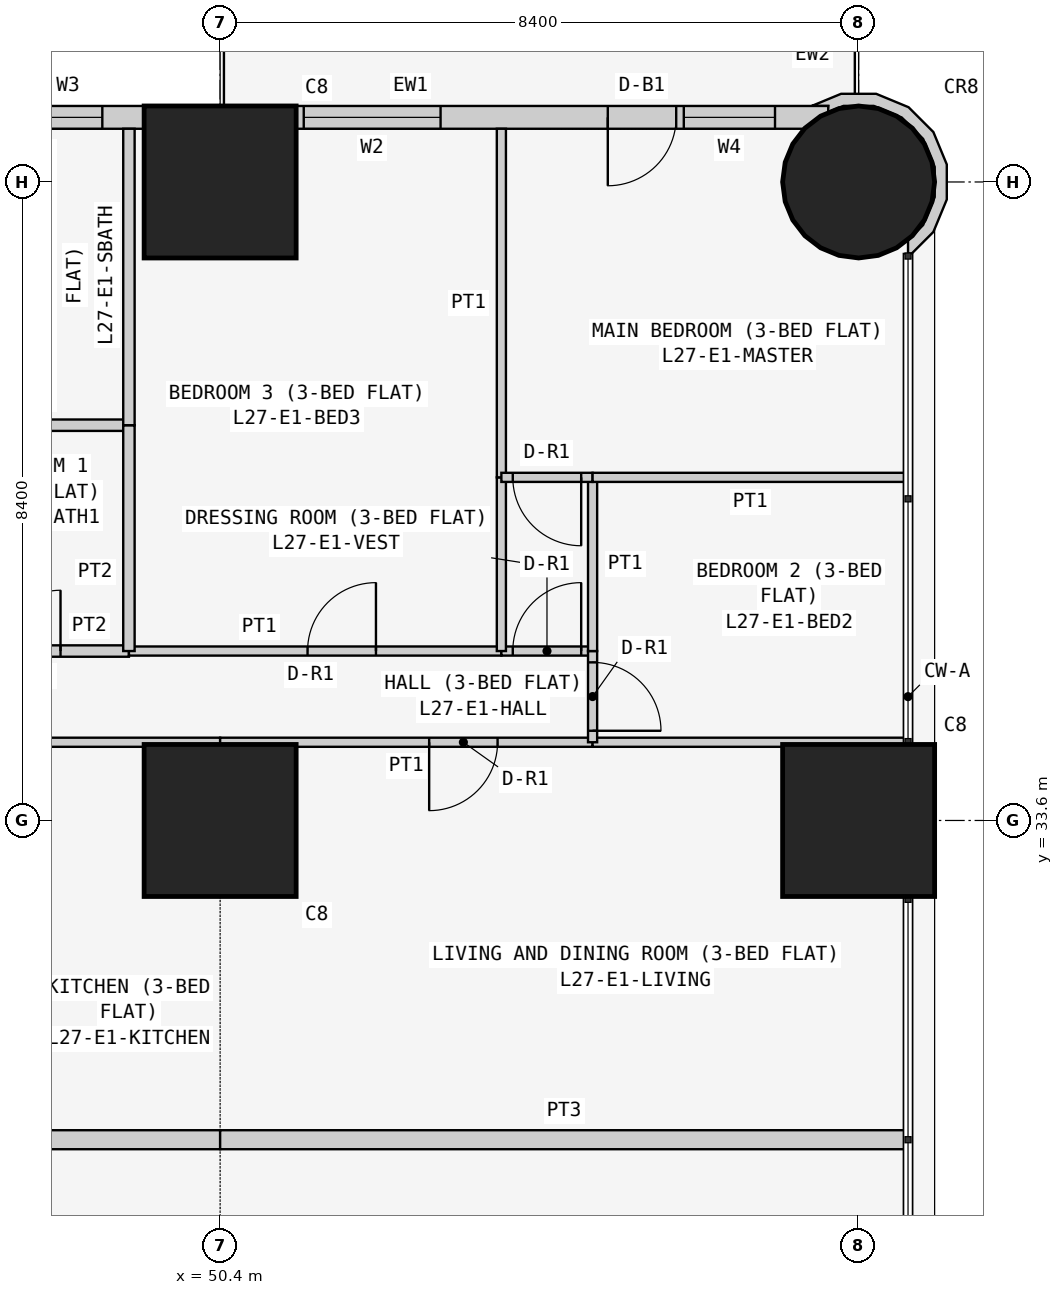
"""IFC4 building model, lengths in metres.
Left out: names, types, materials, properties, quantities, classifications, styles, units other than length and angle.
Written with IfcOpenShell. Run it as: python <this file> out.ifc"""

import sys

from ifc_helpers import new_model, si_unit, direction, frame, frame_2d, origin, origin_2d, place, context, subcontext, project, spatial, polyline, rectangle, circle, outline, extrude, element, fill, save


model = new_model("IFC4")
c1 = context("Model", 3, precision=1e-05, world=origin(), true_north=direction((0.0, 1.0)))
c2 = subcontext(c1, "Body", "Model", "MODEL_VIEW")
j1 = project(units=[si_unit("LENGTHUNIT", "METRE"), si_unit("PLANEANGLEUNIT", "RADIAN")], contexts=[c1])
p1 = place(None, origin())
s1 = spatial("IfcSite", under=j1, at=p1, CompositionType="ELEMENT")
p2 = place(p1, origin())
s2 = spatial("IfcBuilding", under=s1, at=p2, CompositionType="ELEMENT")
p3 = place(p2, frame((0.0, 0.0, 108.9)))
s3 = spatial("IfcBuildingStorey", under=s2, at=p3, CompositionType="ELEMENT", Elevation=108.9)
for number, where, z_axis, x_axis in (
    (1, (50.4, 33.6, 0.0), (0.0, 0.0, 1.0), (1.0, 0.0, 0.0)),
    (2, (50.4, 42.0, 0.0), (0.0, 0.0, 1.0), (1.0, 0.0, 0.0)),
    (3, (58.8, 33.6, 0.0), (0.0, 0.0, 1.0), (1.0, 0.0, 0.0)),
):
    element("IfcColumn", number, at=place(p3, frame(where, z_axis=z_axis, x_axis=x_axis)), inside=s3, PredefinedType="COLUMN", context=c2, shape_type="SweptSolid", body=[
        extrude(rectangle(XDim=2.0, YDim=2.0, at=origin_2d()), origin(), (0.0, 0.0, 1.0), 3.6),
    ])
p4 = place(p3, frame((58.8, 42.0, 0.0), z_axis=(0.0, 0.0, 1.0), x_axis=(1.0, 0.0, 0.0)))
e4 = element("IfcColumn", 4, at=p4, inside=s3, PredefinedType="COLUMN", context=c2, shape_type="SweptSolid", body=[
    extrude(circle(Radius=1.0, at=origin_2d()), origin(), (0.0, 0.0, 1.0), 3.6),
])
p5 = place(p3, frame((58.4, 42.85, 0.0), z_axis=(0.0, 0.0, 1.0), x_axis=(-1.0, 0.0, 0.0)))
e5 = element("IfcWall", 5, at=p5, inside=s3, PredefinedType="SOLIDWALL", context=c2, shape_type="SweptSolid", body=[
    extrude(rectangle(XDim=15.7, YDim=0.3, at=frame_2d((7.85, 0.0))), origin(), (0.0, 0.0, 1.0), 3.45),
])
p6 = place(p5, frame((12.4, 0.0, 0.9)))
e6 = element("IfcOpeningElement", 6, at=p6, cuts=e5, PredefinedType="OPENING", context=c2, shape_type="SweptSolid", body=[
    extrude(rectangle(XDim=1.8, YDim=1.5, at=frame_2d((0.9, 0.75))), frame((0.0, 0.16, 0.0), z_axis=(0.0, -1.0, 0.0), x_axis=(1.0, 0.0, 0.0)), (0.0, 0.0, 1.0), 0.32),
])
p7 = place(p5, frame((9.55, 0.0, 1.5)))
e7 = element("IfcOpeningElement", 7, at=p7, cuts=e5, PredefinedType="OPENING", context=c2, shape_type="SweptSolid", body=[
    extrude(rectangle(XDim=0.9, YDim=0.7, at=frame_2d((0.45, 0.35))), frame((0.0, 0.16, 0.0), z_axis=(0.0, -1.0, 0.0), x_axis=(1.0, 0.0, 0.0)), (0.0, 0.0, 1.0), 0.32),
])
p8 = place(p5, frame((5.1, 0.0, 0.9)))
e8 = element("IfcOpeningElement", 8, at=p8, cuts=e5, PredefinedType="OPENING", context=c2, shape_type="SweptSolid", body=[
    extrude(rectangle(XDim=1.8, YDim=1.5, at=frame_2d((0.9, 0.75))), frame((0.0, 0.16, 0.0), z_axis=(0.0, -1.0, 0.0), x_axis=(1.0, 0.0, 0.0)), (0.0, 0.0, 1.0), 0.32),
])
p9 = place(p5, frame((2.0, 0.0, 0.0)))
e9 = element("IfcOpeningElement", 9, at=p9, cuts=e5, PredefinedType="OPENING", context=c2, shape_type="SweptSolid", body=[
    extrude(rectangle(XDim=0.9, YDim=2.4, at=frame_2d((0.45, 1.2))), frame((0.0, 0.16, 0.0), z_axis=(0.0, -1.0, 0.0), x_axis=(1.0, 0.0, 0.0)), (0.0, 0.0, 1.0), 0.32),
])
p10 = place(p5, frame((0.7, 0.0, 0.9)))
e10 = element("IfcOpeningElement", 10, at=p10, cuts=e5, PredefinedType="OPENING", context=c2, shape_type="SweptSolid", body=[
    extrude(rectangle(XDim=1.2, YDim=1.5, at=frame_2d((0.6, 0.75))), frame((0.0, 0.16, 0.0), z_axis=(0.0, -1.0, 0.0), x_axis=(1.0, 0.0, 0.0)), (0.0, 0.0, 1.0), 0.32),
])
p11 = place(p3, frame((59.443, 41.132, 0.0), z_axis=(0.0, 0.0, 1.0), x_axis=(0.831199417842, 0.555974394895, 0.0)))
e11 = element("IfcWall", 11, at=p11, inside=s3, PredefinedType="SOLIDWALL", context=c2, shape_type="SweptSolid", body=[
    extrude(outline(polyline([(0.784, 0.242), (1.04, 0.626), (1.13, 1.078), (1.04, 1.531), (0.784, 1.915), (0.401, 2.171), (-0.009, 2.253), (0.171, 2.132), (0.113, 2.066), (0.339, 2.021), (0.67, 1.8), (0.891, 1.469), (0.968, 1.078), (0.89, 0.688), (0.669, 0.357), (0.338, 0.136), (0.062, 0.081), (-0.036, -0.066), (0.005, -0.093), (0.4, -0.014), (0.784, 0.242)])), origin(), (0.0, 0.0, 1.0), 3.45),
])
p12 = place(p3, frame((50.4, 34.629, 0.0), z_axis=(0.0, 0.0, 1.0), x_axis=(-1.0, 0.0, 0.0)))
e12 = element("IfcWall", 12, at=p12, inside=s3, PredefinedType="PARTITIONING", context=c2, shape_type="SweptSolid", body=[
    extrude(rectangle(XDim=2.4, YDim=0.12, at=frame_2d((1.2, 0.0))), origin(), (0.0, 0.0, 1.0), 3.45),
])
p13 = place(p3, frame((48.0, 29.4, 0.0), z_axis=(0.0, 0.0, 1.0), x_axis=(1.0, 0.0, 0.0)))
e13 = element("IfcWall", 13, at=p13, inside=s3, PredefinedType="PARTITIONING", context=c2, shape_type="SweptSolid", body=[
    extrude(rectangle(XDim=2.4, YDim=0.25, at=frame_2d((1.2, 0.0))), origin(), (0.0, 0.0, 1.0), 3.45),
])
p14 = place(p3, frame((55.3, 34.629, 0.0), z_axis=(0.0, 0.0, 1.0), x_axis=(-1.0, 0.0, 0.0)))
e14 = element("IfcWall", 14, at=p14, inside=s3, PredefinedType="PARTITIONING", context=c2, shape_type="SweptSolid", body=[
    extrude(rectangle(XDim=4.9, YDim=0.12, at=frame_2d((2.45, 0.0))), origin(), (0.0, 0.0, 1.0), 3.45),
])
p15 = place(p14, frame((1.25, 0.0, 0.0)))
e15 = element("IfcOpeningElement", 15, at=p15, cuts=e14, PredefinedType="OPENING", context=c2, shape_type="SweptSolid", body=[
    extrude(rectangle(XDim=0.9, YDim=2.1, at=frame_2d((0.45, 1.05))), frame((0.0, 0.07, 0.0), z_axis=(0.0, -1.0, 0.0), x_axis=(1.0, 0.0, 0.0)), (0.0, 0.0, 1.0), 0.14),
])
p16 = place(p3, frame((59.45, 34.629, 0.0), z_axis=(0.0, 0.0, 1.0), x_axis=(-1.0, 0.0, 0.0)))
e16 = element("IfcWall", 16, at=p16, inside=s3, PredefinedType="PARTITIONING", context=c2, shape_type="SweptSolid", body=[
    extrude(rectangle(XDim=4.15, YDim=0.12, at=frame_2d((2.075, 0.0))), origin(), (0.0, 0.0, 1.0), 3.45),
])
p17 = place(p3, frame((50.4, 29.4, 0.0), z_axis=(0.0, 0.0, 1.0), x_axis=(1.0, 0.0, 0.0)))
e17 = element("IfcWall", 17, at=p17, inside=s3, PredefinedType="PARTITIONING", context=c2, shape_type="SweptSolid", body=[
    extrude(rectangle(XDim=9.05, YDim=0.25, at=frame_2d((4.525, 0.0))), origin(), (0.0, 0.0, 1.0), 3.45),
])
p18 = place(p3, frame((49.2, 35.829, 0.0), z_axis=(0.0, 0.0, 1.0), x_axis=(-1.0, 0.0, 0.0)))
e18 = element("IfcWall", 18, at=p18, inside=s3, PredefinedType="PARTITIONING", context=c2, shape_type="SweptSolid", body=[
    extrude(rectangle(XDim=2.6, YDim=0.15, at=frame_2d((1.3, 0.0))), origin(), (0.0, 0.0, 1.0), 3.45),
])
p19 = place(p18, frame((0.9, 0.0, 0.0)))
e19 = element("IfcOpeningElement", 19, at=p19, cuts=e18, PredefinedType="OPENING", context=c2, shape_type="SweptSolid", body=[
    extrude(rectangle(XDim=0.8, YDim=2.1, at=frame_2d((0.4, 1.05))), frame((0.0, 0.085, 0.0), z_axis=(0.0, -1.0, 0.0), x_axis=(1.0, 0.0, 0.0)), (0.0, 0.0, 1.0), 0.17),
])
p20 = place(p3, frame((54.1, 35.829, 0.0), z_axis=(0.0, 0.0, 1.0), x_axis=(-1.0, 0.0, 0.0)))
e20 = element("IfcWall", 20, at=p20, inside=s3, PredefinedType="PARTITIONING", context=c2, shape_type="SweptSolid", body=[
    extrude(rectangle(XDim=4.9, YDim=0.12, at=frame_2d((2.45, 0.0))), origin(), (0.0, 0.0, 1.0), 3.45),
])
p21 = place(p20, frame((1.65, 0.0, 0.0)))
e21 = element("IfcOpeningElement", 21, at=p21, cuts=e20, PredefinedType="OPENING", context=c2, shape_type="SweptSolid", body=[
    extrude(rectangle(XDim=0.9, YDim=2.1, at=frame_2d((0.45, 1.05))), frame((0.0, 0.07, 0.0), z_axis=(0.0, -1.0, 0.0), x_axis=(1.0, 0.0, 0.0)), (0.0, 0.0, 1.0), 0.14),
])
p22 = place(p3, frame((55.3, 35.829, 0.0), z_axis=(0.0, 0.0, 1.0), x_axis=(-1.0, 0.0, 0.0)))
e22 = element("IfcWall", 22, at=p22, inside=s3, PredefinedType="PARTITIONING", context=c2, shape_type="SweptSolid", body=[
    extrude(rectangle(XDim=1.2, YDim=0.12, at=frame_2d((0.6, 0.0))), origin(), (0.0, 0.0, 1.0), 3.45),
])
p23 = place(p22, frame((0.15, 0.0, 0.0)))
e23 = element("IfcOpeningElement", 23, at=p23, cuts=e22, PredefinedType="OPENING", context=c2, shape_type="SweptSolid", body=[
    extrude(rectangle(XDim=0.9, YDim=2.1, at=frame_2d((0.45, 1.05))), frame((0.0, 0.07, 0.0), z_axis=(0.0, -1.0, 0.0), x_axis=(1.0, 0.0, 0.0)), (0.0, 0.0, 1.0), 0.14),
])
p24 = place(p3, frame((55.3, 34.629, 0.0), z_axis=(0.0, 0.0, 1.0), x_axis=(0.0, 1.0, 0.0)))
e24 = element("IfcWall", 24, at=p24, inside=s3, PredefinedType="PARTITIONING", context=c2, shape_type="SweptSolid", body=[
    extrude(rectangle(XDim=1.2, YDim=0.12, at=frame_2d((0.6, 0.0))), origin(), (0.0, 0.0, 1.0), 3.45),
])
p25 = place(p24, frame((0.151, 0.0, 0.0)))
e25 = element("IfcOpeningElement", 25, at=p25, cuts=e24, PredefinedType="OPENING", context=c2, shape_type="SweptSolid", body=[
    extrude(rectangle(XDim=0.9, YDim=2.1, at=frame_2d((0.45, 1.05))), frame((0.0, 0.07, 0.0), z_axis=(0.0, -1.0, 0.0), x_axis=(1.0, 0.0, 0.0)), (0.0, 0.0, 1.0), 0.14),
])
p26 = place(p3, frame((49.2, 38.8, 0.0), z_axis=(0.0, 0.0, 1.0), x_axis=(-1.0, 0.0, 0.0)))
e26 = element("IfcWall", 26, at=p26, inside=s3, PredefinedType="PARTITIONING", context=c2, shape_type="SweptSolid", body=[
    extrude(rectangle(XDim=2.6, YDim=0.15, at=frame_2d((1.3, 0.0))), origin(), (0.0, 0.0, 1.0), 3.45),
])
p27 = place(p3, frame((49.2, 35.829, 0.0), z_axis=(0.0, 0.0, 1.0), x_axis=(0.0, 1.0, 0.0)))
e27 = element("IfcWall", 27, at=p27, inside=s3, PredefinedType="PARTITIONING", context=c2, shape_type="SweptSolid", body=[
    extrude(rectangle(XDim=2.971, YDim=0.15, at=frame_2d((1.485, 0.0))), origin(), (0.0, 0.0, 1.0), 3.45),
])
p28 = place(p3, frame((49.2, 38.8, 0.0), z_axis=(0.0, 0.0, 1.0), x_axis=(0.0, 1.0, 0.0)))
e28 = element("IfcWall", 28, at=p28, inside=s3, PredefinedType="PARTITIONING", context=c2, shape_type="SweptSolid", body=[
    extrude(rectangle(XDim=3.9, YDim=0.15, at=frame_2d((1.95, 0.0))), origin(), (0.0, 0.0, 1.0), 3.45),
])
p29 = place(p3, frame((54.1, 35.829, 0.0), z_axis=(0.0, 0.0, 1.0), x_axis=(0.0, 1.0, 0.0)))
e29 = element("IfcWall", 29, at=p29, inside=s3, PredefinedType="PARTITIONING", context=c2, shape_type="SweptSolid", body=[
    extrude(rectangle(XDim=2.285, YDim=0.12, at=frame_2d((1.143, 0.0))), origin(), (0.0, 0.0, 1.0), 3.45),
])
p30 = place(p3, frame((54.1, 38.114, 0.0), z_axis=(0.0, 0.0, 1.0), x_axis=(0.0, 1.0, 0.0)))
e30 = element("IfcWall", 30, at=p30, inside=s3, PredefinedType="PARTITIONING", context=c2, shape_type="SweptSolid", body=[
    extrude(rectangle(XDim=4.586, YDim=0.12, at=frame_2d((2.293, 0.0))), origin(), (0.0, 0.0, 1.0), 3.45),
])
p31 = place(p3, frame((55.3, 35.829, 0.0), z_axis=(0.0, 0.0, 1.0), x_axis=(0.0, 1.0, 0.0)))
e31 = element("IfcWall", 31, at=p31, inside=s3, PredefinedType="PARTITIONING", context=c2, shape_type="SweptSolid", body=[
    extrude(rectangle(XDim=2.285, YDim=0.12, at=frame_2d((1.143, 0.0))), origin(), (0.0, 0.0, 1.0), 3.45),
])
p32 = place(p3, frame((55.3, 38.114, 0.0), z_axis=(0.0, 0.0, 1.0), x_axis=(-1.0, 0.0, 0.0)))
e32 = element("IfcWall", 32, at=p32, inside=s3, PredefinedType="PARTITIONING", context=c2, shape_type="SweptSolid", body=[
    extrude(rectangle(XDim=1.2, YDim=0.12, at=frame_2d((0.6, 0.0))), origin(), (0.0, 0.0, 1.0), 3.45),
])
p33 = place(p32, frame((0.15, 0.0, 0.0)))
e33 = element("IfcOpeningElement", 33, at=p33, cuts=e32, PredefinedType="OPENING", context=c2, shape_type="SweptSolid", body=[
    extrude(rectangle(XDim=0.9, YDim=2.1, at=frame_2d((0.45, 1.05))), frame((0.0, 0.07, 0.0), z_axis=(0.0, -1.0, 0.0), x_axis=(1.0, 0.0, 0.0)), (0.0, 0.0, 1.0), 0.14),
])
p34 = place(p3, frame((59.45, 38.114, 0.0), z_axis=(0.0, 0.0, 1.0), x_axis=(-1.0, 0.0, 0.0)))
e34 = element("IfcWall", 34, at=p34, inside=s3, PredefinedType="PARTITIONING", context=c2, shape_type="SweptSolid", body=[
    extrude(rectangle(XDim=4.15, YDim=0.12, at=frame_2d((2.075, 0.0))), origin(), (0.0, 0.0, 1.0), 3.45),
])
p35 = place(p7, origin())
e35 = element("IfcWindow", 35, at=p35, inside=s3, PartitioningType="SINGLE_PANEL", PredefinedType="WINDOW", context=c2, shape_type="SweptSolid", body=[
    extrude(rectangle(XDim=0.9, YDim=0.7, at=frame_2d((0.45, 0.35))), frame((0.0, 0.03, 0.0), z_axis=(0.0, -1.0, 0.0), x_axis=(1.0, 0.0, 0.0)), (0.0, 0.0, 1.0), 0.06),
])
fill(e7, e35)
p36 = place(p8, origin())
e36 = element("IfcWindow", 36, at=p36, inside=s3, PartitioningType="SINGLE_PANEL", PredefinedType="WINDOW", context=c2, shape_type="SweptSolid", body=[
    extrude(rectangle(XDim=1.8, YDim=1.5, at=frame_2d((0.9, 0.75))), frame((0.0, 0.03, 0.0), z_axis=(0.0, -1.0, 0.0), x_axis=(1.0, 0.0, 0.0)), (0.0, 0.0, 1.0), 0.06),
])
fill(e8, e36)
p37 = place(p9, origin())
e37 = element("IfcDoor", 37, at=p37, inside=s3, OperationType="SINGLE_SWING_RIGHT", PredefinedType="DOOR", context=c2, shape_type="SweptSolid", body=[
    extrude(rectangle(XDim=0.9, YDim=2.4, at=frame_2d((0.45, 1.2))), frame((0.0, 0.025, 0.0), z_axis=(0.0, -1.0, 0.0), x_axis=(1.0, 0.0, 0.0)), (0.0, 0.0, 1.0), 0.05),
])
fill(e9, e37)
p38 = place(p10, origin())
e38 = element("IfcWindow", 38, at=p38, inside=s3, PartitioningType="SINGLE_PANEL", PredefinedType="WINDOW", context=c2, shape_type="SweptSolid", body=[
    extrude(rectangle(XDim=1.2, YDim=1.5, at=frame_2d((0.6, 0.75))), frame((0.0, 0.03, 0.0), z_axis=(0.0, -1.0, 0.0), x_axis=(1.0, 0.0, 0.0)), (0.0, 0.0, 1.0), 0.06),
])
fill(e10, e38)
p39 = place(p15, origin())
e39 = element("IfcDoor", 39, at=p39, inside=s3, OperationType="SINGLE_SWING_RIGHT", PredefinedType="DOOR", context=c2, shape_type="SweptSolid", body=[
    extrude(rectangle(XDim=0.9, YDim=2.1, at=frame_2d((0.45, 1.05))), frame((0.0, 0.025, 0.0), z_axis=(0.0, -1.0, 0.0), x_axis=(1.0, 0.0, 0.0)), (0.0, 0.0, 1.0), 0.05),
])
fill(e15, e39)
p40 = place(p19, frame((0.8, 0.0, 0.0), z_axis=(0.0, 0.0, 1.0), x_axis=(-1.0, 0.0, 0.0)))
e40 = element("IfcDoor", 40, at=p40, inside=s3, OperationType="SINGLE_SWING_RIGHT", PredefinedType="DOOR", context=c2, shape_type="SweptSolid", body=[
    extrude(rectangle(XDim=0.8, YDim=2.1, at=frame_2d((0.4, 1.05))), frame((0.0, 0.025, 0.0), z_axis=(0.0, -1.0, 0.0), x_axis=(1.0, 0.0, 0.0)), (0.0, 0.0, 1.0), 0.05),
])
fill(e19, e40)
p41 = place(p21, frame((0.9, 0.0, 0.0), z_axis=(0.0, 0.0, 1.0), x_axis=(-1.0, 0.0, 0.0)))
e41 = element("IfcDoor", 41, at=p41, inside=s3, OperationType="SINGLE_SWING_RIGHT", PredefinedType="DOOR", context=c2, shape_type="SweptSolid", body=[
    extrude(rectangle(XDim=0.9, YDim=2.1, at=frame_2d((0.45, 1.05))), frame((0.0, 0.025, 0.0), z_axis=(0.0, -1.0, 0.0), x_axis=(1.0, 0.0, 0.0)), (0.0, 0.0, 1.0), 0.05),
])
fill(e21, e41)
p42 = place(p23, frame((0.9, 0.0, 0.0), z_axis=(0.0, 0.0, 1.0), x_axis=(-1.0, 0.0, 0.0)))
e42 = element("IfcDoor", 42, at=p42, inside=s3, OperationType="SINGLE_SWING_RIGHT", PredefinedType="DOOR", context=c2, shape_type="SweptSolid", body=[
    extrude(rectangle(XDim=0.9, YDim=2.1, at=frame_2d((0.45, 1.05))), frame((0.0, 0.025, 0.0), z_axis=(0.0, -1.0, 0.0), x_axis=(1.0, 0.0, 0.0)), (0.0, 0.0, 1.0), 0.05),
])
fill(e23, e42)
p43 = place(p33, origin())
e43 = element("IfcDoor", 43, at=p43, inside=s3, OperationType="SINGLE_SWING_LEFT", PredefinedType="DOOR", context=c2, shape_type="SweptSolid", body=[
    extrude(rectangle(XDim=0.9, YDim=2.1, at=frame_2d((0.45, 1.05))), frame((0.0, 0.025, 0.0), z_axis=(0.0, -1.0, 0.0), x_axis=(1.0, 0.0, 0.0)), (0.0, 0.0, 1.0), 0.05),
])
fill(e33, e43)
p44 = place(p25, frame((0.9, 0.0, 0.0), z_axis=(0.0, 0.0, 1.0), x_axis=(-1.0, 0.0, 0.0)))
e44 = element("IfcDoor", 44, at=p44, inside=s3, OperationType="SINGLE_SWING_RIGHT", PredefinedType="DOOR", context=c2, shape_type="SweptSolid", body=[
    extrude(rectangle(XDim=0.9, YDim=2.1, at=frame_2d((0.45, 1.05))), frame((0.0, 0.025, 0.0), z_axis=(0.0, -1.0, 0.0), x_axis=(1.0, 0.0, 0.0)), (0.0, 0.0, 1.0), 0.05),
])
fill(e25, e44)
save(model, sys.argv[1])
